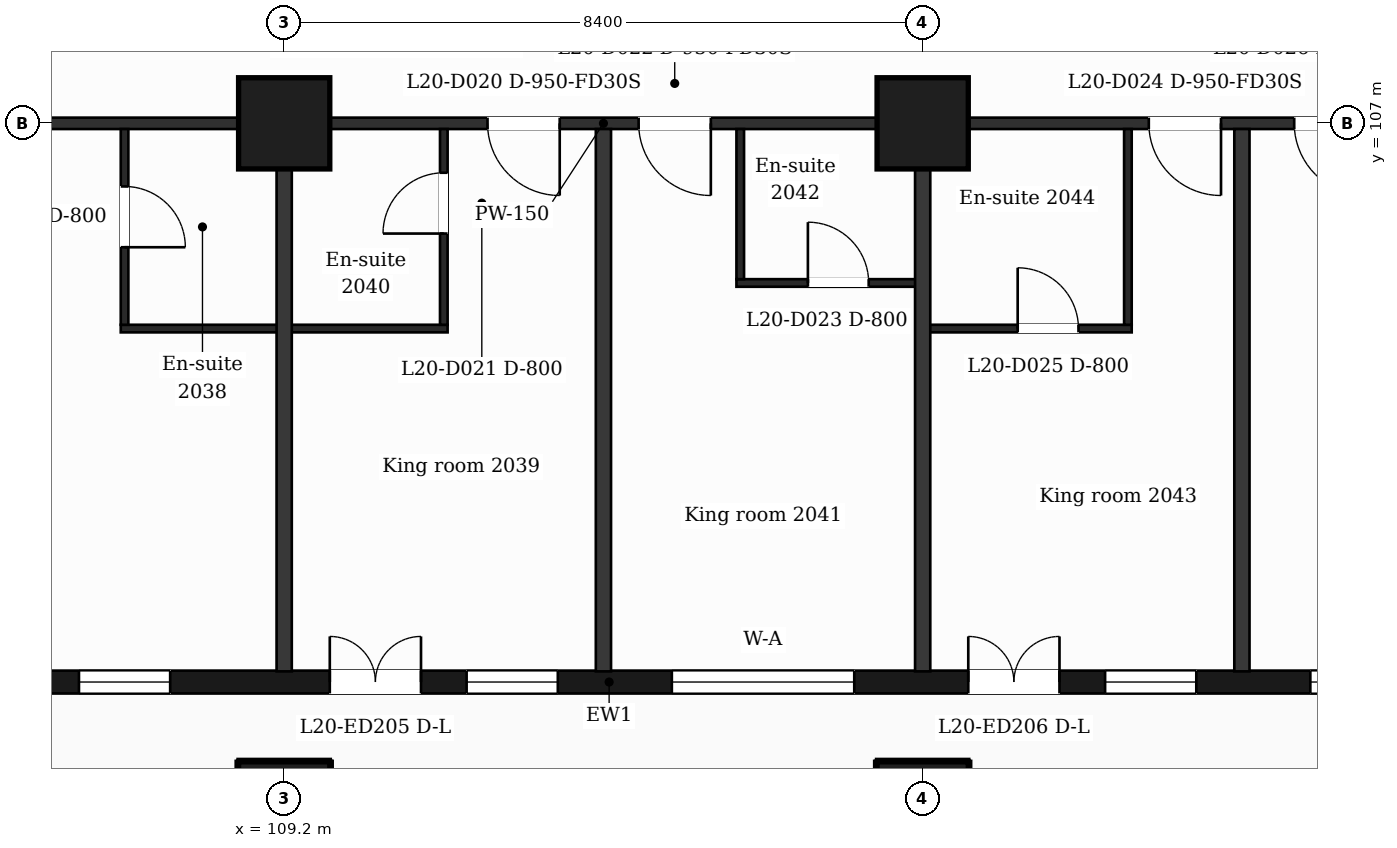
"""IFC4 building model, lengths in metres.
Left out: names, types, materials, properties, quantities, classifications, styles, units other than length and angle.
Written with IfcOpenShell. Run it as: python <this file> out.ifc"""

import sys

from ifc_helpers import new_model, si_unit, direction, frame, frame_2d, origin, origin_2d, place, context, subcontext, project, spatial, rectangle, extrude, element, fill, save


model = new_model("IFC4")
c1 = context("Model", 3, precision=1e-05, world=origin(), true_north=direction((0.0, 1.0)))
c2 = subcontext(c1, "Body", "Model", "MODEL_VIEW")
j1 = project(units=[si_unit("LENGTHUNIT", "METRE"), si_unit("PLANEANGLEUNIT", "RADIAN")], contexts=[c1])
p1 = place(None, origin())
s1 = spatial("IfcSite", under=j1, at=p1, CompositionType="ELEMENT")
p2 = place(p1, origin())
s2 = spatial("IfcBuilding", under=s1, at=p2, CompositionType="ELEMENT")
p3 = place(p2, frame((0.0, 0.0, 91.0)))
s3 = spatial("IfcBuildingStorey", under=s2, at=p3, CompositionType="ELEMENT", Elevation=91.0)
for number, where, z_axis, x_axis in (
    (1, (109.2, 98.0, 0.0), (0.0, 0.0, 1.0), (1.0, 0.0, 0.0)),
    (2, (117.6, 98.0, 0.0), (0.0, 0.0, 1.0), (1.0, 0.0, 0.0)),
    (3, (109.2, 107.0, 0.0), (0.0, 0.0, 1.0), (1.0, 0.0, 0.0)),
    (4, (117.6, 107.0, 0.0), (0.0, 0.0, 1.0), (1.0, 0.0, 0.0)),
):
    element("IfcColumn", number, at=place(p3, frame(where, z_axis=z_axis, x_axis=x_axis)), inside=s3, PredefinedType="COLUMN", context=c2, shape_type="SweptSolid", body=[
        extrude(rectangle(XDim=1.2, YDim=1.2, at=origin_2d()), origin(), (0.0, 0.0, 1.0), 3.7),
    ])
p4 = place(p3, frame((89.85, 99.65, 0.0), z_axis=(0.0, 0.0, 1.0), x_axis=(1.0, 0.0, 0.0)))
e5 = element("IfcWall", 5, at=p4, inside=s3, PredefinedType="SOLIDWALL", context=c2, shape_type="SweptSolid", body=[
    extrude(rectangle(XDim=47.25, YDim=0.3, at=frame_2d((23.625, 0.0))), origin(), (0.0, 0.0, 1.0), 3.38),
])
p5 = place(p4, frame((0.725, 0.0, 0.9)))
e6 = element("IfcOpeningElement", 6, at=p5, cuts=e5, PredefinedType="OPENING", context=c2, shape_type="SweptSolid", body=[
    extrude(rectangle(XDim=1.2, YDim=2.1, at=frame_2d((0.6, 1.05))), frame((0.0, 0.16, 0.0), z_axis=(0.0, -1.0, 0.0), x_axis=(1.0, 0.0, 0.0)), (0.0, 0.0, 1.0), 0.32),
])
p6 = place(p4, frame((3.45, 0.0, 0.9)))
e7 = element("IfcOpeningElement", 7, at=p6, cuts=e5, PredefinedType="OPENING", context=c2, shape_type="SweptSolid", body=[
    extrude(rectangle(XDim=2.4, YDim=2.1, at=frame_2d((1.2, 1.05))), frame((0.0, 0.16, 0.0), z_axis=(0.0, -1.0, 0.0), x_axis=(1.0, 0.0, 0.0)), (0.0, 0.0, 1.0), 0.32),
])
p7 = place(p4, frame((7.65, 0.0, 0.9)))
e8 = element("IfcOpeningElement", 8, at=p7, cuts=e5, PredefinedType="OPENING", context=c2, shape_type="SweptSolid", body=[
    extrude(rectangle(XDim=2.4, YDim=2.1, at=frame_2d((1.2, 1.05))), frame((0.0, 0.16, 0.0), z_axis=(0.0, -1.0, 0.0), x_axis=(1.0, 0.0, 0.0)), (0.0, 0.0, 1.0), 0.32),
])
p8 = place(p4, frame((12.45, 0.0, 0.9)))
e9 = element("IfcOpeningElement", 9, at=p8, cuts=e5, PredefinedType="OPENING", context=c2, shape_type="SweptSolid", body=[
    extrude(rectangle(XDim=1.2, YDim=2.1, at=frame_2d((0.6, 1.05))), frame((0.0, 0.16, 0.0), z_axis=(0.0, -1.0, 0.0), x_axis=(1.0, 0.0, 0.0)), (0.0, 0.0, 1.0), 0.32),
])
p9 = place(p4, frame((16.65, 0.0, 0.9)))
e10 = element("IfcOpeningElement", 10, at=p9, cuts=e5, PredefinedType="OPENING", context=c2, shape_type="SweptSolid", body=[
    extrude(rectangle(XDim=1.2, YDim=2.1, at=frame_2d((0.6, 1.05))), frame((0.0, 0.16, 0.0), z_axis=(0.0, -1.0, 0.0), x_axis=(1.0, 0.0, 0.0)), (0.0, 0.0, 1.0), 0.32),
])
p10 = place(p4, frame((19.95, 0.0, 0.0)))
e11 = element("IfcOpeningElement", 11, at=p10, cuts=e5, PredefinedType="OPENING", context=c2, shape_type="SweptSolid", body=[
    extrude(rectangle(XDim=1.2, YDim=2.4, at=frame_2d((0.6, 1.2))), frame((0.0, 0.16, 0.0), z_axis=(0.0, -1.0, 0.0), x_axis=(1.0, 0.0, 0.0)), (0.0, 0.0, 1.0), 0.32),
])
p11 = place(p4, frame((21.75, 0.0, 0.9)))
e12 = element("IfcOpeningElement", 12, at=p11, cuts=e5, PredefinedType="OPENING", context=c2, shape_type="SweptSolid", body=[
    extrude(rectangle(XDim=1.2, YDim=2.1, at=frame_2d((0.6, 1.05))), frame((0.0, 0.16, 0.0), z_axis=(0.0, -1.0, 0.0), x_axis=(1.0, 0.0, 0.0)), (0.0, 0.0, 1.0), 0.32),
])
p12 = place(p4, frame((24.45, 0.0, 0.9)))
e13 = element("IfcOpeningElement", 13, at=p12, cuts=e5, PredefinedType="OPENING", context=c2, shape_type="SweptSolid", body=[
    extrude(rectangle(XDim=2.4, YDim=2.1, at=frame_2d((1.2, 1.05))), frame((0.0, 0.16, 0.0), z_axis=(0.0, -1.0, 0.0), x_axis=(1.0, 0.0, 0.0)), (0.0, 0.0, 1.0), 0.32),
])
p13 = place(p4, frame((28.35, 0.0, 0.0)))
e14 = element("IfcOpeningElement", 14, at=p13, cuts=e5, PredefinedType="OPENING", context=c2, shape_type="SweptSolid", body=[
    extrude(rectangle(XDim=1.2, YDim=2.4, at=frame_2d((0.6, 1.2))), frame((0.0, 0.16, 0.0), z_axis=(0.0, -1.0, 0.0), x_axis=(1.0, 0.0, 0.0)), (0.0, 0.0, 1.0), 0.32),
])
p14 = place(p4, frame((30.15, 0.0, 0.9)))
e15 = element("IfcOpeningElement", 15, at=p14, cuts=e5, PredefinedType="OPENING", context=c2, shape_type="SweptSolid", body=[
    extrude(rectangle(XDim=1.2, YDim=2.1, at=frame_2d((0.6, 1.05))), frame((0.0, 0.16, 0.0), z_axis=(0.0, -1.0, 0.0), x_axis=(1.0, 0.0, 0.0)), (0.0, 0.0, 1.0), 0.32),
])
p15 = place(p4, frame((32.85, 0.0, 0.9)))
e16 = element("IfcOpeningElement", 16, at=p15, cuts=e5, PredefinedType="OPENING", context=c2, shape_type="SweptSolid", body=[
    extrude(rectangle(XDim=2.4, YDim=2.1, at=frame_2d((1.2, 1.05))), frame((0.0, 0.16, 0.0), z_axis=(0.0, -1.0, 0.0), x_axis=(1.0, 0.0, 0.0)), (0.0, 0.0, 1.0), 0.32),
])
p16 = place(p4, frame((37.05, 0.0, 0.9)))
e17 = element("IfcOpeningElement", 17, at=p16, cuts=e5, PredefinedType="OPENING", context=c2, shape_type="SweptSolid", body=[
    extrude(rectangle(XDim=2.4, YDim=2.1, at=frame_2d((1.2, 1.05))), frame((0.0, 0.16, 0.0), z_axis=(0.0, -1.0, 0.0), x_axis=(1.0, 0.0, 0.0)), (0.0, 0.0, 1.0), 0.32),
])
p17 = place(p4, frame((41.85, 0.0, 0.9)))
e18 = element("IfcOpeningElement", 18, at=p17, cuts=e5, PredefinedType="OPENING", context=c2, shape_type="SweptSolid", body=[
    extrude(rectangle(XDim=1.2, YDim=2.1, at=frame_2d((0.6, 1.05))), frame((0.0, 0.16, 0.0), z_axis=(0.0, -1.0, 0.0), x_axis=(1.0, 0.0, 0.0)), (0.0, 0.0, 1.0), 0.32),
])
p18 = place(p4, frame((45.25, 0.0, 0.9)))
e19 = element("IfcOpeningElement", 19, at=p18, cuts=e5, PredefinedType="OPENING", context=c2, shape_type="SweptSolid", body=[
    extrude(rectangle(XDim=1.2, YDim=2.1, at=frame_2d((0.6, 1.05))), frame((0.0, 0.16, 0.0), z_axis=(0.0, -1.0, 0.0), x_axis=(1.0, 0.0, 0.0)), (0.0, 0.0, 1.0), 0.32),
])
p19 = place(p3, frame((107.05, 104.3, 0.0), z_axis=(0.0, 0.0, 1.0), x_axis=(1.0, 0.0, 0.0)))
e20 = element("IfcWall", 20, at=p19, inside=s3, PredefinedType="PARTITIONING", context=c2, shape_type="SweptSolid", body=[
    extrude(rectangle(XDim=4.3, YDim=0.1, at=frame_2d((2.15, 0.0))), origin(), (0.0, 0.0, 1.0), 3.38),
])
p20 = place(p3, frame((117.6, 104.3, 0.0), z_axis=(0.0, 0.0, 1.0), x_axis=(1.0, 0.0, 0.0)))
e21 = element("IfcWall", 21, at=p20, inside=s3, PredefinedType="PARTITIONING", context=c2, shape_type="SweptSolid", body=[
    extrude(rectangle(XDim=2.75, YDim=0.1, at=frame_2d((1.375, 0.0))), origin(), (0.0, 0.0, 1.0), 3.38),
])
p21 = place(p20, frame((1.25, 0.0, 0.0)))
e22 = element("IfcOpeningElement", 22, at=p21, cuts=e21, PredefinedType="OPENING", context=c2, shape_type="SweptSolid", body=[
    extrude(rectangle(XDim=0.8, YDim=2.1, at=frame_2d((0.4, 1.05))), frame((0.0, 0.06, 0.0), z_axis=(0.0, -1.0, 0.0), x_axis=(1.0, 0.0, 0.0)), (0.0, 0.0, 1.0), 0.12),
])
p22 = place(p3, frame((115.15, 104.9, 0.0), z_axis=(0.0, 0.0, 1.0), x_axis=(1.0, 0.0, 0.0)))
e23 = element("IfcWall", 23, at=p22, inside=s3, PredefinedType="PARTITIONING", context=c2, shape_type="SweptSolid", body=[
    extrude(rectangle(XDim=2.45, YDim=0.1, at=frame_2d((1.225, 0.0))), origin(), (0.0, 0.0, 1.0), 3.38),
])
p23 = place(p22, frame((0.94, 0.0, 0.0)))
e24 = element("IfcOpeningElement", 24, at=p23, cuts=e23, PredefinedType="OPENING", context=c2, shape_type="SweptSolid", body=[
    extrude(rectangle(XDim=0.8, YDim=2.1, at=frame_2d((0.4, 1.05))), frame((0.0, 0.06, 0.0), z_axis=(0.0, -1.0, 0.0), x_axis=(1.0, 0.0, 0.0)), (0.0, 0.0, 1.0), 0.12),
])
p24 = place(p3, frame((87.018, 107.0, 0.0), z_axis=(0.0, 0.0, 1.0), x_axis=(1.0, 0.0, 0.0)))
e25 = element("IfcWall", 25, at=p24, inside=s3, PredefinedType="PARTITIONING", context=c2, shape_type="SweptSolid", body=[
    extrude(rectangle(XDim=52.765, YDim=0.15, at=frame_2d((26.382, 0.0))), origin(), (0.0, 0.0, 1.0), 3.38),
])
p25 = place(p24, frame((1.276, 0.0, 0.0)))
e26 = element("IfcOpeningElement", 26, at=p25, cuts=e25, PredefinedType="OPENING", context=c2, shape_type="SweptSolid", body=[
    extrude(rectangle(XDim=0.95, YDim=2.1, at=frame_2d((0.475, 1.05))), frame((0.0, 0.085, 0.0), z_axis=(0.0, -1.0, 0.0), x_axis=(1.0, 0.0, 0.0)), (0.0, 0.0, 1.0), 0.17),
])
p26 = place(p24, frame((6.752, 0.0, 0.0)))
e27 = element("IfcOpeningElement", 27, at=p26, cuts=e25, PredefinedType="OPENING", context=c2, shape_type="SweptSolid", body=[
    extrude(rectangle(XDim=0.95, YDim=2.1, at=frame_2d((0.475, 1.05))), frame((0.0, 0.085, 0.0), z_axis=(0.0, -1.0, 0.0), x_axis=(1.0, 0.0, 0.0)), (0.0, 0.0, 1.0), 0.17),
])
p27 = place(p24, frame((11.982, 0.0, 0.0)))
e28 = element("IfcOpeningElement", 28, at=p27, cuts=e25, PredefinedType="OPENING", context=c2, shape_type="SweptSolid", body=[
    extrude(rectangle(XDim=0.95, YDim=2.1, at=frame_2d((0.475, 1.05))), frame((0.0, 0.085, 0.0), z_axis=(0.0, -1.0, 0.0), x_axis=(1.0, 0.0, 0.0)), (0.0, 0.0, 1.0), 0.17),
])
p28 = place(p24, frame((16.457, 0.0, 0.0)))
e29 = element("IfcOpeningElement", 29, at=p28, cuts=e25, PredefinedType="OPENING", context=c2, shape_type="SweptSolid", body=[
    extrude(rectangle(XDim=0.95, YDim=2.1, at=frame_2d((0.475, 1.05))), frame((0.0, 0.085, 0.0), z_axis=(0.0, -1.0, 0.0), x_axis=(1.0, 0.0, 0.0)), (0.0, 0.0, 1.0), 0.17),
])
p29 = place(p24, frame((24.857, 0.0, 0.0)))
e30 = element("IfcOpeningElement", 30, at=p29, cuts=e25, PredefinedType="OPENING", context=c2, shape_type="SweptSolid", body=[
    extrude(rectangle(XDim=0.95, YDim=2.1, at=frame_2d((0.475, 1.05))), frame((0.0, 0.085, 0.0), z_axis=(0.0, -1.0, 0.0), x_axis=(1.0, 0.0, 0.0)), (0.0, 0.0, 1.0), 0.17),
])
p30 = place(p24, frame((26.845, 0.0, 0.0)))
e31 = element("IfcOpeningElement", 31, at=p30, cuts=e25, PredefinedType="OPENING", context=c2, shape_type="SweptSolid", body=[
    extrude(rectangle(XDim=0.95, YDim=2.1, at=frame_2d((0.475, 1.05))), frame((0.0, 0.085, 0.0), z_axis=(0.0, -1.0, 0.0), x_axis=(1.0, 0.0, 0.0)), (0.0, 0.0, 1.0), 0.17),
])
p31 = place(p24, frame((33.557, 0.0, 0.0)))
e32 = element("IfcOpeningElement", 32, at=p31, cuts=e25, PredefinedType="OPENING", context=c2, shape_type="SweptSolid", body=[
    extrude(rectangle(XDim=0.95, YDim=2.1, at=frame_2d((0.475, 1.05))), frame((0.0, 0.085, 0.0), z_axis=(0.0, -1.0, 0.0), x_axis=(1.0, 0.0, 0.0)), (0.0, 0.0, 1.0), 0.17),
])
p32 = place(p24, frame((35.47, 0.0, 0.0)))
e33 = element("IfcOpeningElement", 33, at=p32, cuts=e25, PredefinedType="OPENING", context=c2, shape_type="SweptSolid", body=[
    extrude(rectangle(XDim=0.95, YDim=2.1, at=frame_2d((0.475, 1.05))), frame((0.0, 0.085, 0.0), z_axis=(0.0, -1.0, 0.0), x_axis=(1.0, 0.0, 0.0)), (0.0, 0.0, 1.0), 0.17),
])
p33 = place(p24, frame((41.432, 0.0, 0.0)))
e34 = element("IfcOpeningElement", 34, at=p33, cuts=e25, PredefinedType="OPENING", context=c2, shape_type="SweptSolid", body=[
    extrude(rectangle(XDim=0.95, YDim=2.1, at=frame_2d((0.475, 1.05))), frame((0.0, 0.085, 0.0), z_axis=(0.0, -1.0, 0.0), x_axis=(1.0, 0.0, 0.0)), (0.0, 0.0, 1.0), 0.17),
])
p34 = place(p24, frame((43.882, 0.0, 0.0)))
e35 = element("IfcOpeningElement", 35, at=p34, cuts=e25, PredefinedType="OPENING", context=c2, shape_type="SweptSolid", body=[
    extrude(rectangle(XDim=1.0, YDim=2.1, at=frame_2d((0.5, 1.05))), frame((0.0, 0.085, 0.0), z_axis=(0.0, -1.0, 0.0), x_axis=(1.0, 0.0, 0.0)), (0.0, 0.0, 1.0), 0.17),
])
p35 = place(p24, frame((48.974, 0.0, 0.0)))
e36 = element("IfcOpeningElement", 36, at=p35, cuts=e25, PredefinedType="OPENING", context=c2, shape_type="SweptSolid", body=[
    extrude(rectangle(XDim=0.95, YDim=2.1, at=frame_2d((0.475, 1.05))), frame((0.0, 0.085, 0.0), z_axis=(0.0, -1.0, 0.0), x_axis=(1.0, 0.0, 0.0)), (0.0, 0.0, 1.0), 0.17),
])
p36 = place(p3, frame((107.1, 104.35, 0.0), z_axis=(0.0, 0.0, 1.0), x_axis=(0.0, 1.0, 0.0)))
e37 = element("IfcWall", 37, at=p36, inside=s3, PredefinedType="PARTITIONING", context=c2, shape_type="SweptSolid", body=[
    extrude(rectangle(XDim=2.575, YDim=0.1, at=frame_2d((1.288, 0.0))), origin(), (0.0, 0.0, 1.0), 3.38),
])
p37 = place(p36, frame((1.02, 0.0, 0.0)))
e38 = element("IfcOpeningElement", 38, at=p37, cuts=e37, PredefinedType="OPENING", context=c2, shape_type="SweptSolid", body=[
    extrude(rectangle(XDim=0.8, YDim=2.1, at=frame_2d((0.4, 1.05))), frame((0.0, 0.06, 0.0), z_axis=(0.0, -1.0, 0.0), x_axis=(1.0, 0.0, 0.0)), (0.0, 0.0, 1.0), 0.12),
])
p38 = place(p3, frame((109.2, 99.79, 0.0), z_axis=(0.0, 0.0, 1.0), x_axis=(0.0, 1.0, 0.0)))
e39 = element("IfcWall", 39, at=p38, inside=s3, PredefinedType="PARTITIONING", context=c2, shape_type="SweptSolid", body=[
    extrude(rectangle(XDim=7.135, YDim=0.2, at=frame_2d((3.567, 0.0))), origin(), (0.0, 0.0, 1.0), 3.38),
])
p39 = place(p3, frame((111.3, 104.35, 0.0), z_axis=(0.0, 0.0, 1.0), x_axis=(0.0, 1.0, 0.0)))
e40 = element("IfcWall", 40, at=p39, inside=s3, PredefinedType="PARTITIONING", context=c2, shape_type="SweptSolid", body=[
    extrude(rectangle(XDim=2.575, YDim=0.1, at=frame_2d((1.288, 0.0))), origin(), (0.0, 0.0, 1.0), 3.38),
])
p40 = place(p39, frame((1.2, 0.0, 0.0)))
e41 = element("IfcOpeningElement", 41, at=p40, cuts=e40, PredefinedType="OPENING", context=c2, shape_type="SweptSolid", body=[
    extrude(rectangle(XDim=0.8, YDim=2.1, at=frame_2d((0.4, 1.05))), frame((0.0, 0.06, 0.0), z_axis=(0.0, -1.0, 0.0), x_axis=(1.0, 0.0, 0.0)), (0.0, 0.0, 1.0), 0.12),
])
p41 = place(p3, frame((113.4, 99.79, 0.0), z_axis=(0.0, 0.0, 1.0), x_axis=(0.0, 1.0, 0.0)))
e42 = element("IfcWall", 42, at=p41, inside=s3, PredefinedType="PARTITIONING", context=c2, shape_type="SweptSolid", body=[
    extrude(rectangle(XDim=7.135, YDim=0.2, at=frame_2d((3.567, 0.0))), origin(), (0.0, 0.0, 1.0), 3.38),
])
p42 = place(p3, frame((115.2, 104.95, 0.0), z_axis=(0.0, 0.0, 1.0), x_axis=(0.0, 1.0, 0.0)))
e43 = element("IfcWall", 43, at=p42, inside=s3, PredefinedType="PARTITIONING", context=c2, shape_type="SweptSolid", body=[
    extrude(rectangle(XDim=1.975, YDim=0.1, at=frame_2d((0.988, 0.0))), origin(), (0.0, 0.0, 1.0), 3.38),
])
p43 = place(p3, frame((117.6, 99.79, 0.0), z_axis=(0.0, 0.0, 1.0), x_axis=(0.0, 1.0, 0.0)))
e44 = element("IfcWall", 44, at=p43, inside=s3, PredefinedType="PARTITIONING", context=c2, shape_type="SweptSolid", body=[
    extrude(rectangle(XDim=7.135, YDim=0.2, at=frame_2d((3.567, 0.0))), origin(), (0.0, 0.0, 1.0), 3.38),
])
p44 = place(p3, frame((120.3, 104.35, 0.0), z_axis=(0.0, 0.0, 1.0), x_axis=(0.0, 1.0, 0.0)))
e45 = element("IfcWall", 45, at=p44, inside=s3, PredefinedType="PARTITIONING", context=c2, shape_type="SweptSolid", body=[
    extrude(rectangle(XDim=2.575, YDim=0.1, at=frame_2d((1.288, 0.0))), origin(), (0.0, 0.0, 1.0), 3.38),
])
p45 = place(p3, frame((121.8, 99.79, 0.0), z_axis=(0.0, 0.0, 1.0), x_axis=(0.0, 1.0, 0.0)))
e46 = element("IfcWall", 46, at=p45, inside=s3, PredefinedType="PARTITIONING", context=c2, shape_type="SweptSolid", body=[
    extrude(rectangle(XDim=7.135, YDim=0.2, at=frame_2d((3.567, 0.0))), origin(), (0.0, 0.0, 1.0), 3.38),
])
p46 = place(p9, origin())
e47 = element("IfcWindow", 47, at=p46, inside=s3, PartitioningType="SINGLE_PANEL", PredefinedType="WINDOW", context=c2, shape_type="SweptSolid", body=[
    extrude(rectangle(XDim=1.2, YDim=2.1, at=frame_2d((0.6, 1.05))), frame((0.0, 0.03, 0.0), z_axis=(0.0, -1.0, 0.0), x_axis=(1.0, 0.0, 0.0)), (0.0, 0.0, 1.0), 0.06),
])
fill(e10, e47)
p47 = place(p10, origin())
e48 = element("IfcDoor", 48, at=p47, inside=s3, OperationType="DOUBLE_DOOR_SINGLE_SWING", PredefinedType="DOOR", context=c2, shape_type="SweptSolid", body=[
    extrude(rectangle(XDim=1.2, YDim=2.4, at=frame_2d((0.6, 1.2))), frame((0.0, 0.025, 0.0), z_axis=(0.0, -1.0, 0.0), x_axis=(1.0, 0.0, 0.0)), (0.0, 0.0, 1.0), 0.05),
])
fill(e11, e48)
p48 = place(p11, origin())
e49 = element("IfcWindow", 49, at=p48, inside=s3, PartitioningType="SINGLE_PANEL", PredefinedType="WINDOW", context=c2, shape_type="SweptSolid", body=[
    extrude(rectangle(XDim=1.2, YDim=2.1, at=frame_2d((0.6, 1.05))), frame((0.0, 0.03, 0.0), z_axis=(0.0, -1.0, 0.0), x_axis=(1.0, 0.0, 0.0)), (0.0, 0.0, 1.0), 0.06),
])
fill(e12, e49)
p49 = place(p12, origin())
e50 = element("IfcWindow", 50, at=p49, inside=s3, PartitioningType="SINGLE_PANEL", PredefinedType="WINDOW", context=c2, shape_type="SweptSolid", body=[
    extrude(rectangle(XDim=2.4, YDim=2.1, at=frame_2d((1.2, 1.05))), frame((0.0, 0.03, 0.0), z_axis=(0.0, -1.0, 0.0), x_axis=(1.0, 0.0, 0.0)), (0.0, 0.0, 1.0), 0.06),
])
fill(e13, e50)
p50 = place(p13, origin())
e51 = element("IfcDoor", 51, at=p50, inside=s3, OperationType="DOUBLE_DOOR_SINGLE_SWING", PredefinedType="DOOR", context=c2, shape_type="SweptSolid", body=[
    extrude(rectangle(XDim=1.2, YDim=2.4, at=frame_2d((0.6, 1.2))), frame((0.0, 0.025, 0.0), z_axis=(0.0, -1.0, 0.0), x_axis=(1.0, 0.0, 0.0)), (0.0, 0.0, 1.0), 0.05),
])
fill(e14, e51)
p51 = place(p14, origin())
e52 = element("IfcWindow", 52, at=p51, inside=s3, PartitioningType="SINGLE_PANEL", PredefinedType="WINDOW", context=c2, shape_type="SweptSolid", body=[
    extrude(rectangle(XDim=1.2, YDim=2.1, at=frame_2d((0.6, 1.05))), frame((0.0, 0.03, 0.0), z_axis=(0.0, -1.0, 0.0), x_axis=(1.0, 0.0, 0.0)), (0.0, 0.0, 1.0), 0.06),
])
fill(e15, e52)
p52 = place(p15, origin())
e53 = element("IfcWindow", 53, at=p52, inside=s3, PartitioningType="SINGLE_PANEL", PredefinedType="WINDOW", context=c2, shape_type="SweptSolid", body=[
    extrude(rectangle(XDim=2.4, YDim=2.1, at=frame_2d((1.2, 1.05))), frame((0.0, 0.03, 0.0), z_axis=(0.0, -1.0, 0.0), x_axis=(1.0, 0.0, 0.0)), (0.0, 0.0, 1.0), 0.06),
])
fill(e16, e53)
p53 = place(p37, origin())
e54 = element("IfcDoor", 54, at=p53, inside=s3, OperationType="SINGLE_SWING_LEFT", PredefinedType="DOOR", context=c2, shape_type="SweptSolid", body=[
    extrude(rectangle(XDim=0.8, YDim=2.1, at=frame_2d((0.4, 1.05))), frame((0.0, 0.025, 0.0), z_axis=(0.0, -1.0, 0.0), x_axis=(1.0, 0.0, 0.0)), (0.0, 0.0, 1.0), 0.05),
])
fill(e38, e54)
p54 = place(p29, origin())
e55 = element("IfcDoor", 55, at=p54, inside=s3, OperationType="SINGLE_SWING_RIGHT", PredefinedType="DOOR", context=c2, shape_type="SweptSolid", body=[
    extrude(rectangle(XDim=0.95, YDim=2.1, at=frame_2d((0.475, 1.05))), frame((0.0, 0.025, 0.0), z_axis=(0.0, -1.0, 0.0), x_axis=(1.0, 0.0, 0.0)), (0.0, 0.0, 1.0), 0.05),
])
fill(e30, e55)
p55 = place(p40, origin())
e56 = element("IfcDoor", 56, at=p55, inside=s3, OperationType="SINGLE_SWING_LEFT", PredefinedType="DOOR", context=c2, shape_type="SweptSolid", body=[
    extrude(rectangle(XDim=0.8, YDim=2.1, at=frame_2d((0.4, 1.05))), frame((0.0, 0.025, 0.0), z_axis=(0.0, -1.0, 0.0), x_axis=(1.0, 0.0, 0.0)), (0.0, 0.0, 1.0), 0.05),
])
fill(e41, e56)
p56 = place(p30, origin())
e57 = element("IfcDoor", 57, at=p56, inside=s3, OperationType="SINGLE_SWING_RIGHT", PredefinedType="DOOR", context=c2, shape_type="SweptSolid", body=[
    extrude(rectangle(XDim=0.95, YDim=2.1, at=frame_2d((0.475, 1.05))), frame((0.0, 0.025, 0.0), z_axis=(0.0, -1.0, 0.0), x_axis=(1.0, 0.0, 0.0)), (0.0, 0.0, 1.0), 0.05),
])
fill(e31, e57)
p57 = place(p23, origin())
e58 = element("IfcDoor", 58, at=p57, inside=s3, OperationType="SINGLE_SWING_LEFT", PredefinedType="DOOR", context=c2, shape_type="SweptSolid", body=[
    extrude(rectangle(XDim=0.8, YDim=2.1, at=frame_2d((0.4, 1.05))), frame((0.0, 0.025, 0.0), z_axis=(0.0, -1.0, 0.0), x_axis=(1.0, 0.0, 0.0)), (0.0, 0.0, 1.0), 0.05),
])
fill(e24, e58)
p58 = place(p31, origin())
e59 = element("IfcDoor", 59, at=p58, inside=s3, OperationType="SINGLE_SWING_RIGHT", PredefinedType="DOOR", context=c2, shape_type="SweptSolid", body=[
    extrude(rectangle(XDim=0.95, YDim=2.1, at=frame_2d((0.475, 1.05))), frame((0.0, 0.025, 0.0), z_axis=(0.0, -1.0, 0.0), x_axis=(1.0, 0.0, 0.0)), (0.0, 0.0, 1.0), 0.05),
])
fill(e32, e59)
p59 = place(p21, origin())
e60 = element("IfcDoor", 60, at=p59, inside=s3, OperationType="SINGLE_SWING_LEFT", PredefinedType="DOOR", context=c2, shape_type="SweptSolid", body=[
    extrude(rectangle(XDim=0.8, YDim=2.1, at=frame_2d((0.4, 1.05))), frame((0.0, 0.025, 0.0), z_axis=(0.0, -1.0, 0.0), x_axis=(1.0, 0.0, 0.0)), (0.0, 0.0, 1.0), 0.05),
])
fill(e22, e60)
p60 = place(p32, origin())
e61 = element("IfcDoor", 61, at=p60, inside=s3, OperationType="SINGLE_SWING_RIGHT", PredefinedType="DOOR", context=c2, shape_type="SweptSolid", body=[
    extrude(rectangle(XDim=0.95, YDim=2.1, at=frame_2d((0.475, 1.05))), frame((0.0, 0.025, 0.0), z_axis=(0.0, -1.0, 0.0), x_axis=(1.0, 0.0, 0.0)), (0.0, 0.0, 1.0), 0.05),
])
fill(e33, e61)
save(model, sys.argv[1])
